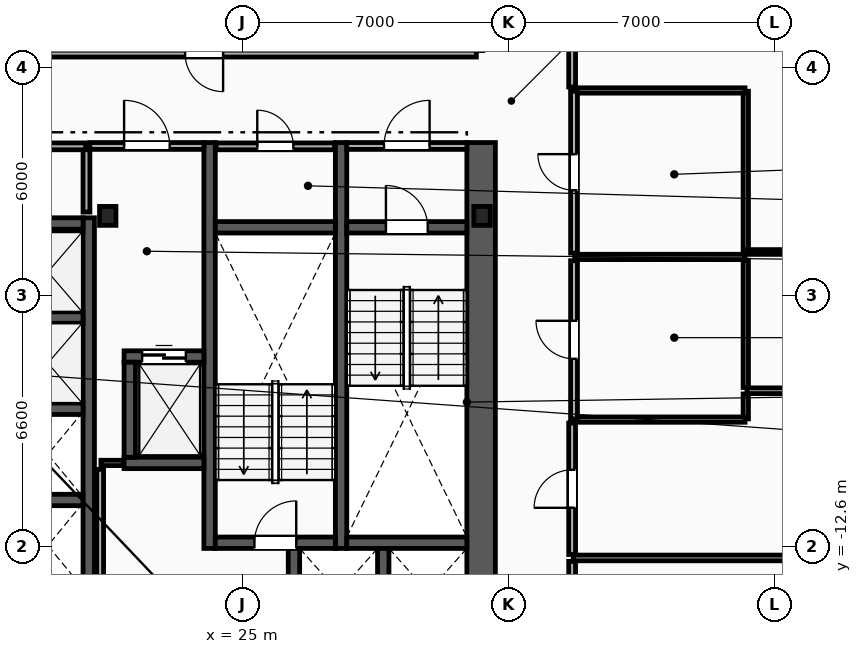
"""IFC4 building model, lengths in metres.
Left out: names, types, materials, properties, quantities, classifications, styles, units other than length and angle.
Written with IfcOpenShell. Run it as: python <this file> out.ifc"""

import sys

from ifc_helpers import new_model, si_unit, direction, frame, frame_2d, origin, origin_2d, place, context, subcontext, project, spatial, rectangle, i_section, extrude, element, fill, save


model = new_model("IFC4")
c1 = context("Model", 3, precision=1e-05, world=origin(), true_north=direction((0.0, 1.0)))
c2 = subcontext(c1, "Body", "Model", "MODEL_VIEW")
j1 = project(units=[si_unit("LENGTHUNIT", "METRE"), si_unit("PLANEANGLEUNIT", "RADIAN")], contexts=[c1])
p1 = place(None, origin())
s1 = spatial("IfcSite", under=j1, at=p1, CompositionType="ELEMENT")
p2 = place(p1, origin())
s2 = spatial("IfcBuilding", under=s1, at=p2, CompositionType="ELEMENT")
p3 = place(p2, frame((0.0, 0.0, 121.4)))
s3 = spatial("IfcBuildingStorey", under=s2, at=p3, CompositionType="ELEMENT", Elevation=121.4)
for number, where, z_axis, x_axis in (
    (1, (31.3, -3.9, 0.0), (0.0, 0.0, 1.0), (1.0, 0.0, 0.0)),
    (2, (21.45, -3.9, 0.0), (0.0, 0.0, 1.0), (1.0, 0.0, 0.0)),
):
    element("IfcColumn", number, at=place(p3, frame(where, z_axis=z_axis, x_axis=x_axis)), inside=s3, PredefinedType="COLUMN", context=c2, shape_type="SweptSolid", body=[
        extrude(i_section(OverallWidth=0.432, OverallDepth=0.498, WebThickness=0.056, FlangeThickness=0.089, FilletRadius=0.018, at=origin_2d()), origin(), (0.0, 0.0, 1.0), 3.6),
    ])
p4 = place(p3, frame((31.275, -15.3, 0.0), z_axis=(0.0, 0.0, 1.0), x_axis=(0.0, 1.0, 0.0)))
e3 = element("IfcWall", 3, at=p4, inside=s3, PredefinedType="SHEAR", context=c2, shape_type="SweptSolid", body=[
    extrude(rectangle(XDim=13.33, YDim=0.75, at=frame_2d((6.665, 0.0))), origin(), (0.0, 0.0, 1.0), 3.3),
])
for number, where, z_axis, x_axis in (
    (4, (27.59, -12.65, 0.0), (0.0, 0.0, 1.0), (0.0, 1.0, 0.0)),
    (5, (24.13, -12.65, 0.0), (0.0, 0.0, 1.0), (0.0, 1.0, 0.0)),
):
    element("IfcWall", number, at=place(p3, frame(where, z_axis=z_axis, x_axis=x_axis)), inside=s3, PredefinedType="SHEAR", context=c2, shape_type="SweptSolid", body=[
        extrude(rectangle(XDim=10.68, YDim=0.3, at=frame_2d((5.34, 0.0))), origin(), (0.0, 0.0, 1.0), 3.3),
    ])
p5 = place(p3, frame((27.74, -4.2, 0.0), z_axis=(0.0, 0.0, 1.0), x_axis=(1.0, 0.0, 0.0)))
e6 = element("IfcWall", 6, at=p5, inside=s3, PredefinedType="SHEAR", context=c2, shape_type="SweptSolid", body=[
    extrude(rectangle(XDim=3.16, YDim=0.3, at=frame_2d((1.58, 0.0))), origin(), (0.0, 0.0, 1.0), 3.3),
])
p6 = place(p5, frame((1.03, 0.0, 0.0)))
e7 = element("IfcOpeningElement", 7, at=p6, cuts=e6, PredefinedType="OPENING", context=c2, shape_type="SweptSolid", body=[
    extrude(rectangle(XDim=1.1, YDim=2.15, at=frame_2d((0.55, 1.075))), frame((0.0, 0.16, 0.0), z_axis=(0.0, -1.0, 0.0), x_axis=(1.0, 0.0, 0.0)), (0.0, 0.0, 1.0), 0.32),
])
p7 = place(p3, frame((27.74, -12.5, 0.0), z_axis=(0.0, 0.0, 1.0), x_axis=(1.0, 0.0, 0.0)))
e8 = element("IfcWall", 8, at=p7, inside=s3, PredefinedType="SHEAR", context=c2, shape_type="SweptSolid", body=[
    extrude(rectangle(XDim=3.16, YDim=0.3, at=frame_2d((1.58, 0.0))), origin(), (0.0, 0.0, 1.0), 3.3),
])
p8 = place(p3, frame((24.28, -12.5, 0.0), z_axis=(0.0, 0.0, 1.0), x_axis=(1.0, 0.0, 0.0)))
e9 = element("IfcWall", 9, at=p8, inside=s3, PredefinedType="SHEAR", context=c2, shape_type="SweptSolid", body=[
    extrude(rectangle(XDim=3.16, YDim=0.3, at=frame_2d((1.58, 0.0))), origin(), (0.0, 0.0, 1.0), 3.3),
])
p9 = place(p8, frame((1.03, 0.0, 0.0)))
e10 = element("IfcOpeningElement", 10, at=p9, cuts=e9, PredefinedType="OPENING", context=c2, shape_type="SweptSolid", body=[
    extrude(rectangle(XDim=1.1, YDim=2.15, at=frame_2d((0.55, 1.075))), frame((0.0, 0.16, 0.0), z_axis=(0.0, -1.0, 0.0), x_axis=(1.0, 0.0, 0.0)), (0.0, 0.0, 1.0), 0.32),
])
p10 = place(p3, frame((24.28, -4.2, 0.0), z_axis=(0.0, 0.0, 1.0), x_axis=(1.0, 0.0, 0.0)))
e11 = element("IfcWall", 11, at=p10, inside=s3, PredefinedType="SHEAR", context=c2, shape_type="SweptSolid", body=[
    extrude(rectangle(XDim=3.16, YDim=0.3, at=frame_2d((1.58, 0.0))), origin(), (0.0, 0.0, 1.0), 3.3),
])
p11 = place(p3, frame((20.89, -3.8, 0.0), z_axis=(0.0, 0.0, 1.0), x_axis=(0.0, 1.0, 0.0)))
e12 = element("IfcWall", 12, at=p11, inside=s3, PredefinedType="PARTITIONING", context=c2, shape_type="SweptSolid", body=[
    extrude(rectangle(XDim=1.65, YDim=0.18, at=frame_2d((0.825, 0.0))), origin(), (0.0, 0.0, 1.0), 3.3),
])
p12 = place(p3, frame((20.98, -2.06, 0.0), z_axis=(0.0, 0.0, 1.0), x_axis=(1.0, 0.0, 0.0)))
e13 = element("IfcWall", 13, at=p12, inside=s3, PredefinedType="PARTITIONING", context=c2, shape_type="SweptSolid", body=[
    extrude(rectangle(XDim=3.0, YDim=0.18, at=frame_2d((1.5, 0.0))), origin(), (0.0, 0.0, 1.0), 3.3),
])
p13 = place(p12, frame((0.9, 0.0, 0.0)))
e14 = element("IfcOpeningElement", 14, at=p13, cuts=e13, PredefinedType="OPENING", context=c2, shape_type="SweptSolid", body=[
    extrude(rectangle(XDim=1.2, YDim=2.15, at=frame_2d((0.6, 1.075))), frame((0.0, 0.1, 0.0), z_axis=(0.0, -1.0, 0.0), x_axis=(1.0, 0.0, 0.0)), (0.0, 0.0, 1.0), 0.2),
])
p14 = place(p3, frame((27.74, -2.06, 0.0), z_axis=(0.0, 0.0, 1.0), x_axis=(1.0, 0.0, 0.0)))
e15 = element("IfcWall", 15, at=p14, inside=s3, PredefinedType="PARTITIONING", context=c2, shape_type="SweptSolid", body=[
    extrude(rectangle(XDim=3.16, YDim=0.18, at=frame_2d((1.58, 0.0))), origin(), (0.0, 0.0, 1.0), 3.3),
])
p15 = place(p14, frame((0.98, 0.0, 0.0)))
e16 = element("IfcOpeningElement", 16, at=p15, cuts=e15, PredefinedType="OPENING", context=c2, shape_type="SweptSolid", body=[
    extrude(rectangle(XDim=1.2, YDim=2.15, at=frame_2d((0.6, 1.075))), frame((0.0, 0.1, 0.0), z_axis=(0.0, -1.0, 0.0), x_axis=(1.0, 0.0, 0.0)), (0.0, 0.0, 1.0), 0.2),
])
p16 = place(p3, frame((21.88, -7.6, 0.0), z_axis=(0.0, 0.0, 1.0), x_axis=(1.0, 0.0, 0.0)))
e17 = element("IfcWall", 17, at=p16, inside=s3, PredefinedType="SHEAR", context=c2, shape_type="SweptSolid", body=[
    extrude(rectangle(XDim=2.1, YDim=0.3, at=frame_2d((1.05, 0.0))), origin(), (0.0, 0.0, 1.0), 3.3),
])
p17 = place(p16, frame((0.475, 0.0, 0.0)))
e18 = element("IfcOpeningElement", 18, at=p17, cuts=e17, PredefinedType="OPENING", context=c2, shape_type="SweptSolid", body=[
    extrude(rectangle(XDim=1.15, YDim=2.2, at=frame_2d((0.575, 1.1))), frame((0.0, 0.16, 0.0), z_axis=(0.0, -1.0, 0.0), x_axis=(1.0, 0.0, 0.0)), (0.0, 0.0, 1.0), 0.32),
])
p18 = place(p3, frame((21.88, -10.4, 0.0), z_axis=(0.0, 0.0, 1.0), x_axis=(1.0, 0.0, 0.0)))
e19 = element("IfcWall", 19, at=p18, inside=s3, PredefinedType="SHEAR", context=c2, shape_type="SweptSolid", body=[
    extrude(rectangle(XDim=2.1, YDim=0.3, at=frame_2d((1.05, 0.0))), origin(), (0.0, 0.0, 1.0), 3.3),
])
p19 = place(p3, frame((22.03, -10.25, 0.0), z_axis=(0.0, 0.0, 1.0), x_axis=(0.0, 1.0, 0.0)))
e20 = element("IfcWall", 20, at=p19, inside=s3, PredefinedType="SHEAR", context=c2, shape_type="SweptSolid", body=[
    extrude(rectangle(XDim=2.5, YDim=0.3, at=frame_2d((1.25, 0.0))), origin(), (0.0, 0.0, 1.0), 3.3),
])
for number, where, z_axis, x_axis in (
    (21, (28.7, -14.95, 0.0), (0.0, 0.0, 1.0), (0.0, 1.0, 0.0)),
    (22, (26.35, -14.95, 0.0), (0.0, 0.0, 1.0), (0.0, 1.0, 0.0)),
):
    element("IfcWall", number, at=place(p3, frame(where, z_axis=z_axis, x_axis=x_axis)), inside=s3, PredefinedType="SHEAR", context=c2, shape_type="SweptSolid", body=[
        extrude(rectangle(XDim=2.3, YDim=0.3, at=frame_2d((1.15, 0.0))), origin(), (0.0, 0.0, 1.0), 3.3),
    ])
p20 = place(p3, frame((20.95, -14.0, 0.0), z_axis=(0.0, 0.0, 1.0), x_axis=(0.0, 1.0, 0.0)))
e23 = element("IfcWall", 23, at=p20, inside=s3, PredefinedType="SHEAR", context=c2, shape_type="SweptSolid", body=[
    extrude(rectangle(XDim=10.05, YDim=0.3, at=frame_2d((5.025, 0.0))), origin(), (0.0, 0.0, 1.0), 3.3),
])
p21 = place(p3, frame((18.65, -4.1, 0.0), z_axis=(0.0, 0.0, 1.0), x_axis=(1.0, 0.0, 0.0)))
e24 = element("IfcWall", 24, at=p21, inside=s3, PredefinedType="SHEAR", context=c2, shape_type="SweptSolid", body=[
    extrude(rectangle(XDim=2.15, YDim=0.3, at=frame_2d((1.075, 0.0))), origin(), (0.0, 0.0, 1.0), 3.3),
])
for number, where, z_axis, x_axis in (
    (25, (18.95, -11.375, 0.0), (0.0, 0.0, 1.0), (1.0, 0.0, 0.0)),
    (26, (18.95, -8.975, 0.0), (0.0, 0.0, 1.0), (1.0, 0.0, 0.0)),
    (27, (18.95, -6.575, 0.0), (0.0, 0.0, 1.0), (1.0, 0.0, 0.0)),
):
    element("IfcWall", number, at=place(p3, frame(where, z_axis=z_axis, x_axis=x_axis)), inside=s3, PredefinedType="SHEAR", context=c2, shape_type="SweptSolid", body=[
        extrude(rectangle(XDim=1.85, YDim=0.3, at=frame_2d((0.925, 0.0))), origin(), (0.0, 0.0, 1.0), 3.3),
    ])
p22 = place(p3, frame((17.12, -2.07, 0.0), z_axis=(0.0, 0.0, 1.0), x_axis=(1.0, 0.0, 0.0)))
e28 = element("IfcWall", 28, at=p22, inside=s3, PredefinedType="PARTITIONING", context=c2, shape_type="SweptSolid", body=[
    extrude(rectangle(XDim=3.75, YDim=0.18, at=frame_2d((1.875, 0.0))), origin(), (0.0, 0.0, 1.0), 3.3),
])
p23 = place(p22, frame((1.4, 0.0, 0.0)))
e29 = element("IfcOpeningElement", 29, at=p23, cuts=e28, PredefinedType="OPENING", context=c2, shape_type="SweptSolid", body=[
    extrude(rectangle(XDim=0.95, YDim=2.1, at=frame_2d((0.475, 1.05))), frame((0.0, 0.1, 0.0), z_axis=(0.0, -1.0, 0.0), x_axis=(1.0, 0.0, 0.0)), (0.0, 0.0, 1.0), 0.2),
])
p24 = place(p3, frame((21.27, -10.4, 0.0), z_axis=(0.0, 0.0, 1.0), x_axis=(1.0, 0.0, 0.0)))
e30 = element("IfcWall", 30, at=p24, inside=s3, PredefinedType="PARTITIONING", context=c2, shape_type="SweptSolid", body=[
    extrude(rectangle(XDim=0.59, YDim=0.14, at=frame_2d((0.295, 0.0))), origin(), (0.0, 0.0, 1.0), 3.3),
])
p25 = place(p3, frame((21.25, -14.93, 0.0), z_axis=(0.0, 0.0, 1.0), x_axis=(0.0, 1.0, 0.0)))
e31 = element("IfcWall", 31, at=p25, inside=s3, PredefinedType="PARTITIONING", context=c2, shape_type="SweptSolid", body=[
    extrude(rectangle(XDim=4.36, YDim=0.18, at=frame_2d((2.18, 0.0))), origin(), (0.0, 0.0, 1.0), 3.3),
])
p26 = place(p3, frame((24.3, -2.07, 0.0), z_axis=(0.0, 0.0, 1.0), x_axis=(1.0, 0.0, 0.0)))
e32 = element("IfcWall", 32, at=p26, inside=s3, PredefinedType="PARTITIONING", context=c2, shape_type="SweptSolid", body=[
    extrude(rectangle(XDim=3.12, YDim=0.18, at=frame_2d((1.56, 0.0))), origin(), (0.0, 0.0, 1.0), 3.3),
])
p27 = place(p26, frame((1.085, 0.0, 0.0)))
e33 = element("IfcOpeningElement", 33, at=p27, cuts=e32, PredefinedType="OPENING", context=c2, shape_type="SweptSolid", body=[
    extrude(rectangle(XDim=0.95, YDim=2.1, at=frame_2d((0.475, 1.05))), frame((0.0, 0.1, 0.0), z_axis=(0.0, -1.0, 0.0), x_axis=(1.0, 0.0, 0.0)), (0.0, 0.0, 1.0), 0.2),
])
p28 = place(p3, frame((38.24, -9.24, 0.0), z_axis=(0.0, 0.0, 1.0), x_axis=(0.0, 1.0, 0.0)))
e34 = element("IfcWall", 34, at=p28, inside=s3, PredefinedType="PARTITIONING", context=c2, shape_type="SweptSolid", body=[
    extrude(rectangle(XDim=0.655, YDim=0.14, at=frame_2d((0.328, 0.0))), origin(), (0.0, 0.0, 1.0), 3.3),
])
p29 = place(p3, frame((38.24, -8.415, 0.0), z_axis=(0.0, 0.0, 1.0), x_axis=(0.0, 1.0, 0.0)))
e35 = element("IfcWall", 35, at=p29, inside=s3, PredefinedType="PARTITIONING", context=c2, shape_type="SweptSolid", body=[
    extrude(rectangle(XDim=3.35, YDim=0.14, at=frame_2d((1.675, 0.0))), origin(), (0.0, 0.0, 1.0), 3.3),
])
p30 = place(p3, frame((38.24, -4.895, 0.0), z_axis=(0.0, 0.0, 1.0), x_axis=(0.0, 1.0, 0.0)))
e36 = element("IfcWall", 36, at=p30, inside=s3, PredefinedType="PARTITIONING", context=c2, shape_type="SweptSolid", body=[
    extrude(rectangle(XDim=4.275, YDim=0.14, at=frame_2d((2.137, 0.0))), origin(), (0.0, 0.0, 1.0), 3.3),
])
for number, where, z_axis, x_axis in (
    (37, (33.74, -0.6, 0.0), (0.0, 0.0, 1.0), (1.0, 0.0, 0.0)),
    (38, (33.74, -4.98, 0.0), (0.0, 0.0, 1.0), (1.0, 0.0, 0.0)),
    (39, (33.74, -9.26, 0.0), (0.0, 0.0, 1.0), (1.0, 0.0, 0.0)),
):
    element("IfcWall", number, at=place(p3, frame(where, z_axis=z_axis, x_axis=x_axis)), inside=s3, PredefinedType="PARTITIONING", context=c2, shape_type="SweptSolid", body=[
        extrude(rectangle(XDim=4.48, YDim=0.14, at=frame_2d((2.24, 0.0))), origin(), (0.0, 0.0, 1.0), 3.3),
    ])
p31 = place(p3, frame((33.72, -4.88, 0.0), z_axis=(0.0, 0.0, 1.0), x_axis=(0.0, 1.0, 0.0)))
e40 = element("IfcWall", 40, at=p31, inside=s3, PredefinedType="PARTITIONING", context=c2, shape_type="SweptSolid", body=[
    extrude(rectangle(XDim=4.26, YDim=0.18, at=frame_2d((2.13, 0.0))), origin(), (0.0, 0.0, 1.0), 3.3),
])
p32 = place(p31, frame((1.655, 0.0, 0.0)))
e41 = element("IfcOpeningElement", 41, at=p32, cuts=e40, PredefinedType="OPENING", context=c2, shape_type="SweptSolid", body=[
    extrude(rectangle(XDim=0.95, YDim=2.1, at=frame_2d((0.475, 1.05))), frame((0.0, 0.1, 0.0), z_axis=(0.0, -1.0, 0.0), x_axis=(1.0, 0.0, 0.0)), (0.0, 0.0, 1.0), 0.2),
])
p33 = place(p3, frame((33.72, -9.24, 0.0), z_axis=(0.0, 0.0, 1.0), x_axis=(0.0, 1.0, 0.0)))
e42 = element("IfcWall", 42, at=p33, inside=s3, PredefinedType="PARTITIONING", context=c2, shape_type="SweptSolid", body=[
    extrude(rectangle(XDim=4.16, YDim=0.18, at=frame_2d((2.08, 0.0))), origin(), (0.0, 0.0, 1.0), 3.3),
])
p34 = place(p33, frame((1.58, 0.0, 0.0)))
e43 = element("IfcOpeningElement", 43, at=p34, cuts=e42, PredefinedType="OPENING", context=c2, shape_type="SweptSolid", body=[
    extrude(rectangle(XDim=1.0, YDim=2.15, at=frame_2d((0.5, 1.075))), frame((0.0, 0.1, 0.0), z_axis=(0.0, -1.0, 0.0), x_axis=(1.0, 0.0, 0.0)), (0.0, 0.0, 1.0), 0.2),
])
p35 = place(p3, frame((38.27, -8.5, 0.0), z_axis=(0.0, 0.0, 1.0), x_axis=(1.0, 0.0, 0.0)))
e44 = element("IfcWall", 44, at=p35, inside=s3, PredefinedType="PARTITIONING", context=c2, shape_type="SweptSolid", body=[
    extrude(rectangle(XDim=12.546, YDim=0.15, at=frame_2d((6.273, 0.0))), origin(), (0.0, 0.0, 1.0), 3.3),
])
p36 = place(p3, frame((33.7, -12.9, 0.0), z_axis=(0.0, 0.0, 1.0), x_axis=(1.0, 0.0, 0.0)))
e45 = element("IfcWall", 45, at=p36, inside=s3, PredefinedType="PARTITIONING", context=c2, shape_type="SweptSolid", body=[
    extrude(rectangle(XDim=16.231, YDim=0.15, at=frame_2d((8.115, 0.0))), origin(), (0.0, 0.0, 1.0), 3.3),
])
p37 = place(p3, frame((33.67, -17.428, 0.0), z_axis=(0.0, 0.0, 1.0), x_axis=(0.0, 1.0, 0.0)))
e46 = element("IfcWall", 46, at=p37, inside=s3, PredefinedType="PARTITIONING", context=c2, shape_type="SweptSolid", body=[
    extrude(rectangle(XDim=4.438, YDim=0.18, at=frame_2d((2.219, 0.0))), origin(), (0.0, 0.0, 1.0), 3.3),
])
p38 = place(p37, frame((1.719, 0.0, 0.0)))
e47 = element("IfcOpeningElement", 47, at=p38, cuts=e46, PredefinedType="OPENING", context=c2, shape_type="SweptSolid", body=[
    extrude(rectangle(XDim=1.0, YDim=2.15, at=frame_2d((0.5, 1.075))), frame((0.0, 0.1, 0.0), z_axis=(0.0, -1.0, 0.0), x_axis=(1.0, 0.0, 0.0)), (0.0, 0.0, 1.0), 0.2),
])
p39 = place(p3, frame((33.67, -12.81, 0.0), z_axis=(0.0, 0.0, 1.0), x_axis=(0.0, 1.0, 0.0)))
e48 = element("IfcWall", 48, at=p39, inside=s3, PredefinedType="PARTITIONING", context=c2, shape_type="SweptSolid", body=[
    extrude(rectangle(XDim=3.459, YDim=0.18, at=frame_2d((1.729, 0.0))), origin(), (0.0, 0.0, 1.0), 3.3),
])
p40 = place(p39, frame((1.229, 0.0, 0.0)))
e49 = element("IfcOpeningElement", 49, at=p40, cuts=e48, PredefinedType="OPENING", context=c2, shape_type="SweptSolid", body=[
    extrude(rectangle(XDim=1.0, YDim=2.15, at=frame_2d((0.5, 1.075))), frame((0.0, 0.1, 0.0), z_axis=(0.0, -1.0, 0.0), x_axis=(1.0, 0.0, 0.0)), (0.0, 0.0, 1.0), 0.2),
])
p41 = place(p3, frame((31.15, 0.37, 0.0), z_axis=(0.0, 0.0, 1.0), x_axis=(-1.0, 0.0, 0.0)))
e50 = element("IfcWall", 50, at=p41, inside=s3, PredefinedType="PARTITIONING", context=c2, shape_type="SweptSolid", body=[
    extrude(rectangle(XDim=14.328, YDim=0.18, at=frame_2d((7.164, 0.0))), origin(), (0.0, 0.0, 1.0), 3.3),
])
p42 = place(p41, frame((6.664, 0.0, 0.0)))
e51 = element("IfcOpeningElement", 51, at=p42, cuts=e50, PredefinedType="OPENING", context=c2, shape_type="SweptSolid", body=[
    extrude(rectangle(XDim=1.0, YDim=2.15, at=frame_2d((0.5, 1.075))), frame((0.0, 0.1, 0.0), z_axis=(0.0, -1.0, 0.0), x_axis=(1.0, 0.0, 0.0)), (0.0, 0.0, 1.0), 0.2),
])
p43 = place(p3, frame((33.67, -0.509, 0.0), z_axis=(0.0, 0.0, 1.0), x_axis=(0.0, 1.0, 0.0)))
e52 = element("IfcWall", 52, at=p43, inside=s3, PredefinedType="PARTITIONING", context=c2, shape_type="SweptSolid", body=[
    extrude(rectangle(XDim=5.769, YDim=0.18, at=frame_2d((2.884, 0.0))), origin(), (0.0, 0.0, 1.0), 3.3),
])
p44 = place(p43, frame((2.384, 0.0, 0.0)))
e53 = element("IfcOpeningElement", 53, at=p44, cuts=e52, PredefinedType="OPENING", context=c2, shape_type="SweptSolid", body=[
    extrude(rectangle(XDim=1.0, YDim=2.15, at=frame_2d((0.5, 1.075))), frame((0.0, 0.1, 0.0), z_axis=(0.0, -1.0, 0.0), x_axis=(1.0, 0.0, 0.0)), (0.0, 0.0, 1.0), 0.2),
])
p45 = place(p3, frame((38.292, -4.85, 0.0), z_axis=(0.0, 0.0, 1.0), x_axis=(1.0, 0.0, 0.0)))
e54 = element("IfcWall", 54, at=p45, inside=s3, PredefinedType="PARTITIONING", context=c2, shape_type="SweptSolid", body=[
    extrude(rectangle(XDim=12.723, YDim=0.125, at=frame_2d((6.361, 0.0))), origin(), (0.0, 0.0, 1.0), 3.3),
])
p46 = place(p45, frame((5.861, 0.0, 0.0)))
e55 = element("IfcOpeningElement", 55, at=p46, cuts=e54, PredefinedType="OPENING", context=c2, shape_type="SweptSolid", body=[
    extrude(rectangle(XDim=1.0, YDim=2.15, at=frame_2d((0.5, 1.075))), frame((0.0, 0.073, 0.0), z_axis=(0.0, -1.0, 0.0), x_axis=(1.0, 0.0, 0.0)), (0.0, 0.0, 1.0), 0.145),
])
p47 = place(p6, origin())
e56 = element("IfcDoor", 56, at=p47, inside=s3, OperationType="SINGLE_SWING_LEFT", PredefinedType="DOOR", context=c2, shape_type="SweptSolid", body=[
    extrude(rectangle(XDim=1.1, YDim=2.15, at=frame_2d((0.55, 1.075))), frame((0.0, 0.025, 0.0), z_axis=(0.0, -1.0, 0.0), x_axis=(1.0, 0.0, 0.0)), (0.0, 0.0, 1.0), 0.05),
])
fill(e7, e56)
p48 = place(p9, origin())
e57 = element("IfcDoor", 57, at=p48, inside=s3, OperationType="SINGLE_SWING_RIGHT", PredefinedType="DOOR", context=c2, shape_type="SweptSolid", body=[
    extrude(rectangle(XDim=1.1, YDim=2.15, at=frame_2d((0.55, 1.075))), frame((0.0, 0.025, 0.0), z_axis=(0.0, -1.0, 0.0), x_axis=(1.0, 0.0, 0.0)), (0.0, 0.0, 1.0), 0.05),
])
fill(e10, e57)
p49 = place(p13, origin())
e58 = element("IfcDoor", 58, at=p49, inside=s3, OperationType="SINGLE_SWING_LEFT", PredefinedType="DOOR", context=c2, shape_type="SweptSolid", body=[
    extrude(rectangle(XDim=1.2, YDim=2.15, at=frame_2d((0.6, 1.075))), frame((0.0, 0.025, 0.0), z_axis=(0.0, -1.0, 0.0), x_axis=(1.0, 0.0, 0.0)), (0.0, 0.0, 1.0), 0.05),
])
fill(e14, e58)
p50 = place(p15, origin())
e59 = element("IfcDoor", 59, at=p50, inside=s3, OperationType="SINGLE_SWING_RIGHT", PredefinedType="DOOR", context=c2, shape_type="SweptSolid", body=[
    extrude(rectangle(XDim=1.2, YDim=2.15, at=frame_2d((0.6, 1.075))), frame((0.0, 0.025, 0.0), z_axis=(0.0, -1.0, 0.0), x_axis=(1.0, 0.0, 0.0)), (0.0, 0.0, 1.0), 0.05),
])
fill(e16, e59)
p51 = place(p17, origin())
e60 = element("IfcDoor", 60, at=p51, inside=s3, OperationType="SLIDING_TO_LEFT", PredefinedType="TRAPDOOR", context=c2, shape_type="SweptSolid", body=[
    extrude(rectangle(XDim=1.15, YDim=2.2, at=frame_2d((0.575, 1.1))), frame((0.0, 0.025, 0.0), z_axis=(0.0, -1.0, 0.0), x_axis=(1.0, 0.0, 0.0)), (0.0, 0.0, 1.0), 0.05),
])
fill(e18, e60)
p52 = place(p42, origin())
e61 = element("IfcDoor", 61, at=p52, inside=s3, OperationType="SINGLE_SWING_LEFT", PredefinedType="DOOR", context=c2, shape_type="SweptSolid", body=[
    extrude(rectangle(XDim=1.0, YDim=2.15, at=frame_2d((0.5, 1.075))), frame((0.0, 0.025, 0.0), z_axis=(0.0, -1.0, 0.0), x_axis=(1.0, 0.0, 0.0)), (0.0, 0.0, 1.0), 0.05),
])
fill(e51, e61)
p53 = place(p32, origin())
e62 = element("IfcDoor", 62, at=p53, inside=s3, OperationType="SINGLE_SWING_RIGHT", PredefinedType="DOOR", context=c2, shape_type="SweptSolid", body=[
    extrude(rectangle(XDim=0.95, YDim=2.1, at=frame_2d((0.475, 1.05))), frame((0.0, 0.025, 0.0), z_axis=(0.0, -1.0, 0.0), x_axis=(1.0, 0.0, 0.0)), (0.0, 0.0, 1.0), 0.05),
])
fill(e41, e62)
p54 = place(p34, origin())
e63 = element("IfcDoor", 63, at=p54, inside=s3, OperationType="SINGLE_SWING_RIGHT", PredefinedType="DOOR", context=c2, shape_type="SweptSolid", body=[
    extrude(rectangle(XDim=1.0, YDim=2.15, at=frame_2d((0.5, 1.075))), frame((0.0, 0.025, 0.0), z_axis=(0.0, -1.0, 0.0), x_axis=(1.0, 0.0, 0.0)), (0.0, 0.0, 1.0), 0.05),
])
fill(e43, e63)
p55 = place(p40, origin())
e64 = element("IfcDoor", 64, at=p55, inside=s3, OperationType="SINGLE_SWING_LEFT", PredefinedType="DOOR", context=c2, shape_type="SweptSolid", body=[
    extrude(rectangle(XDim=1.0, YDim=2.15, at=frame_2d((0.5, 1.075))), frame((0.0, 0.025, 0.0), z_axis=(0.0, -1.0, 0.0), x_axis=(1.0, 0.0, 0.0)), (0.0, 0.0, 1.0), 0.05),
])
fill(e49, e64)
p56 = place(p27, origin())
e65 = element("IfcDoor", 65, at=p56, inside=s3, OperationType="SINGLE_SWING_LEFT", PredefinedType="DOOR", context=c2, shape_type="SweptSolid", body=[
    extrude(rectangle(XDim=0.95, YDim=2.1, at=frame_2d((0.475, 1.05))), frame((0.0, 0.025, 0.0), z_axis=(0.0, -1.0, 0.0), x_axis=(1.0, 0.0, 0.0)), (0.0, 0.0, 1.0), 0.05),
])
fill(e33, e65)
save(model, sys.argv[1])
